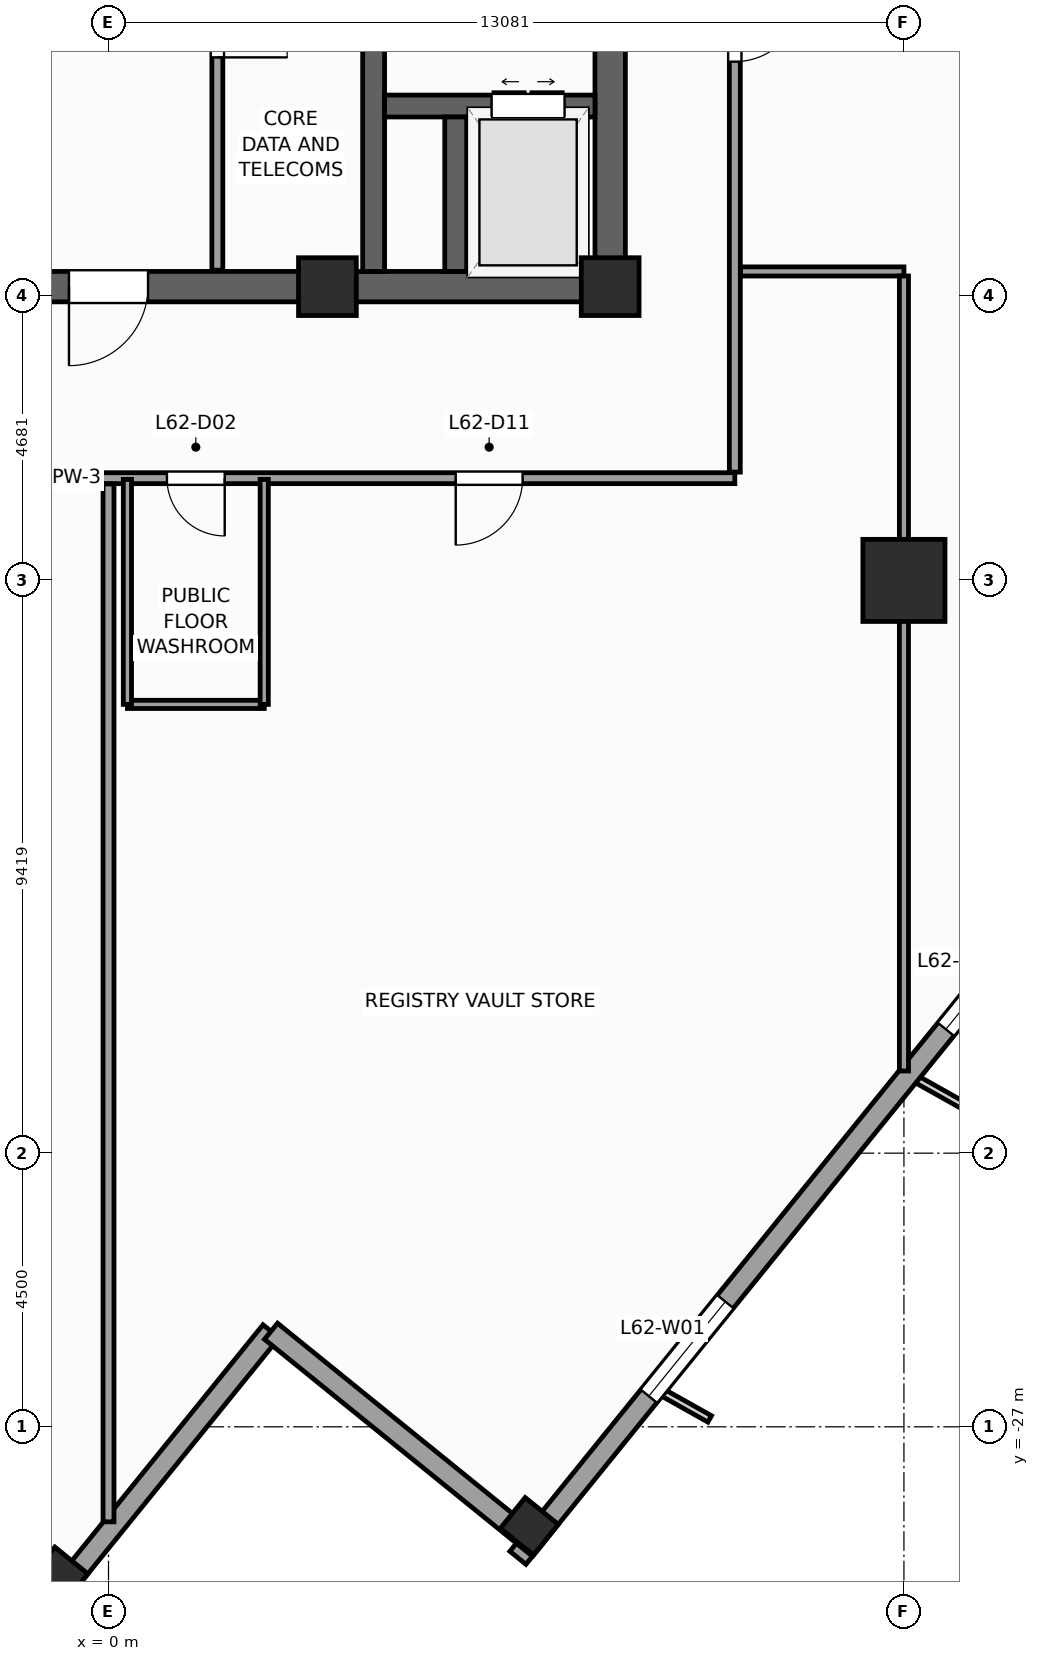
"""IFC4 building model, lengths in metres.
Left out: names, types, materials, properties, quantities, classifications, styles, units other than length and angle.
Written with IfcOpenShell. Run it as: python <this file> out.ifc"""

import sys

from ifc_helpers import new_model, si_unit, direction, frame, frame_2d, origin, origin_2d, place, context, subcontext, project, spatial, rectangle, extrude, source, transform, mapped, element, fill, save


model = new_model("IFC4")
c1 = context("Model", 3, precision=1e-05, world=origin(), true_north=direction((0.0, 1.0)))
c2 = subcontext(c1, "Body", "Model", "MODEL_VIEW")
j1 = project(units=[si_unit("LENGTHUNIT", "METRE"), si_unit("PLANEANGLEUNIT", "RADIAN")], contexts=[c1])
p1 = place(None, origin())
s1 = spatial("IfcSite", under=j1, at=p1, CompositionType="ELEMENT")
p2 = place(p1, origin())
s2 = spatial("IfcBuilding", under=s1, at=p2, CompositionType="ELEMENT")
p3 = place(p2, frame((0.0, 0.0, 256.3)))
s3 = spatial("IfcBuildingStorey", under=s2, at=p3, CompositionType="ELEMENT", Elevation=256.3)
p4 = place(p3, frame((-8.5, -8.25, 0.0), z_axis=(0.0, 0.0, 1.0), x_axis=(1.0, 0.0, 0.0)))
e1 = element("IfcWall", 1, at=p4, inside=s3, PredefinedType="SHEAR", context=c2, shape_type="SweptSolid", body=[
    extrude(rectangle(XDim=17.0, YDim=0.5, at=frame_2d((8.5, 0.0))), origin(), (0.0, 0.0, 1.0), 3.9),
])
p5 = place(p4, frame((7.85, 0.0, 0.0)))
e2 = element("IfcOpeningElement", 2, at=p5, cuts=e1, PredefinedType="OPENING", context=c2, shape_type="SweptSolid", body=[
    extrude(rectangle(XDim=1.3, YDim=2.2, at=frame_2d((0.65, 1.1))), frame((0.0, 0.26, 0.0), z_axis=(0.0, -1.0, 0.0), x_axis=(1.0, 0.0, 0.0)), (0.0, 0.0, 1.0), 0.52),
])
p6 = place(p3, frame((8.25, -8.0, 0.0), z_axis=(0.0, 0.0, 1.0), x_axis=(0.0, 1.0, 0.0)))
e3 = element("IfcWall", 3, at=p6, inside=s3, PredefinedType="SHEAR", context=c2, shape_type="SweptSolid", body=[
    extrude(rectangle(XDim=16.0, YDim=0.5, at=frame_2d((8.0, 0.0))), origin(), (0.0, 0.0, 1.0), 3.9),
])
p7 = place(p6, frame((4.69, 0.0, 0.0)))
e4 = element("IfcOpeningElement", 4, at=p7, cuts=e3, PredefinedType="OPENING", context=c2, shape_type="SweptSolid", body=[
    extrude(rectangle(XDim=1.3, YDim=2.2, at=frame_2d((0.65, 1.1))), frame((0.0, 0.26, 0.0), z_axis=(0.0, -1.0, 0.0), x_axis=(1.0, 0.0, 0.0)), (0.0, 0.0, 1.0), 0.52),
])
p8 = place(p3, frame((4.36, -8.0, 0.0), z_axis=(0.0, 0.0, 1.0), x_axis=(0.0, 1.0, 0.0)))
e5 = element("IfcWall", 5, at=p8, inside=s3, PredefinedType="SHEAR", context=c2, shape_type="SweptSolid", body=[
    extrude(rectangle(XDim=16.0, YDim=0.36, at=frame_2d((8.0, 0.0))), origin(), (0.0, 0.0, 1.0), 3.9),
])
p9 = place(p3, frame((4.54, -5.28, 0.0), z_axis=(0.0, 0.0, 1.0), x_axis=(1.0, 0.0, 0.0)))
e6 = element("IfcWall", 6, at=p9, inside=s3, PredefinedType="SHEAR", context=c2, shape_type="SweptSolid", body=[
    extrude(rectangle(XDim=3.46, YDim=0.36, at=frame_2d((1.73, 0.0))), origin(), (0.0, 0.0, 1.0), 3.9),
])
p10 = place(p9, frame((1.76, 0.0, 0.0)))
e7 = element("IfcOpeningElement", 7, at=p10, cuts=e6, PredefinedType="OPENING", context=c2, shape_type="SweptSolid", body=[
    extrude(rectangle(XDim=1.2, YDim=2.25, at=frame_2d((0.6, 1.125))), frame((0.0, 0.19, 0.0), z_axis=(0.0, -1.0, 0.0), x_axis=(1.0, 0.0, 0.0)), (0.0, 0.0, 1.0), 0.38),
])
p11 = place(p3, frame((5.71, -8.0, 0.0), z_axis=(0.0, 0.0, 1.0), x_axis=(0.0, 1.0, 0.0)))
e8 = element("IfcWall", 8, at=p11, inside=s3, PredefinedType="SHEAR", context=c2, shape_type="SweptSolid", body=[
    extrude(rectangle(XDim=2.54, YDim=0.36, at=frame_2d((1.27, 0.0))), origin(), (0.0, 0.0, 1.0), 3.9),
])
m1 = source(origin(), c2, "Body", "SweptSolid", [
    extrude(rectangle(XDim=0.95, YDim=0.95, at=origin_2d()), origin(), (0.0, 0.0, 1.0), 3.9),
])
for number, where, z_axis, x_axis in (
    (9, (8.25, -8.25, 0.0), (0.0, 0.0, 1.0), (1.0, 0.0, 0.0)),
    (10, (3.6, -8.25, 0.0), (0.0, 0.0, 1.0), (1.0, 0.0, 0.0)),
):
    element("IfcColumn", number, at=place(p3, frame(where, z_axis=z_axis, x_axis=x_axis)), inside=s3, PredefinedType="PILASTER", context=c2, shape_type="MappedRepresentation", body=[
        mapped(m1, transform((0.0, 0.0, 0.0), scale=1.0)),
    ])
m2 = source(origin(), c2, "Body", "SweptSolid", [
    extrude(rectangle(XDim=1.35, YDim=1.35, at=origin_2d()), origin(), (0.0, 0.0, 1.0), 3.9),
])
p12 = place(p3, frame((13.081, -13.081, 0.0), z_axis=(0.0, 0.0, 1.0), x_axis=(1.0, 0.0, 0.0)))
e11 = element("IfcColumn", 11, at=p12, inside=s3, PredefinedType="COLUMN", context=c2, shape_type="MappedRepresentation", body=[
    mapped(m2, transform((0.0, 0.0, 0.0), scale=1.0)),
])
m3 = source(origin(), c2, "Body", "SweptSolid", [
    extrude(rectangle(XDim=0.65, YDim=0.7, at=origin_2d()), origin(), (0.0, 0.0, 1.0), 3.9),
])
for number, where, z_axis, x_axis in (
    (12, (6.92, -28.637, 0.0), (0.0, 0.0, 1.0), (0.629, 0.777, 0.0)),
    (13, (-0.815, -29.45, 0.0), (0.0, 0.0, 1.0), (0.629, 0.777, 0.0)),
):
    element("IfcColumn", number, at=place(p3, frame(where, z_axis=z_axis, x_axis=x_axis)), inside=s3, PredefinedType="COLUMN", context=c2, shape_type="MappedRepresentation", body=[
        mapped(m3, transform((0.0, 0.0, 0.0), scale=1.0)),
    ])
p13 = place(p3, frame((6.733, -29.154, 0.0), z_axis=(0.0, 0.0, 1.0), x_axis=(0.629325378072, 0.77714192302, 0.0)))
e14 = element("IfcWall", 14, at=p13, inside=s3, PredefinedType="STANDARD", context=c2, shape_type="SweptSolid", body=[
    extrude(rectangle(XDim=36.84, YDim=0.34, at=frame_2d((18.42, 0.0))), origin(), (0.0, 0.0, 1.0), 2.02),
])
p14 = place(p13, frame((23.495, 0.0, 0.0)))
e15 = element("IfcOpeningElement", 15, at=p14, cuts=e14, PredefinedType="OPENING", context=c2, shape_type="SweptSolid", body=[
    extrude(rectangle(XDim=1.05, YDim=2.02, at=frame_2d((0.525, 1.01))), frame((0.0, 0.18, 0.0), z_axis=(0.0, -1.0, 0.0), x_axis=(1.0, 0.0, 0.0)), (0.0, 0.0, 1.0), 0.36),
])
p15 = place(p13, frame((3.421, 0.0, 0.49)))
e16 = element("IfcOpeningElement", 16, at=p15, cuts=e14, PredefinedType="OPENING", context=c2, shape_type="SweptSolid", body=[
    extrude(rectangle(XDim=2.0, YDim=1.45, at=frame_2d((1.0, 0.725))), frame((0.0, 0.18, 0.0), z_axis=(0.0, -1.0, 0.0), x_axis=(1.0, 0.0, 0.0)), (0.0, 0.0, 1.0), 0.36),
])
p16 = place(p13, frame((11.184, 0.0, 0.49)))
e17 = element("IfcOpeningElement", 17, at=p16, cuts=e14, PredefinedType="OPENING", context=c2, shape_type="SweptSolid", body=[
    extrude(rectangle(XDim=2.0, YDim=1.45, at=frame_2d((1.0, 0.725))), frame((0.0, 0.18, 0.0), z_axis=(0.0, -1.0, 0.0), x_axis=(1.0, 0.0, 0.0)), (0.0, 0.0, 1.0), 0.36),
])
p17 = place(p13, frame((15.183, 0.0, 0.49)))
e18 = element("IfcOpeningElement", 18, at=p17, cuts=e14, PredefinedType="OPENING", context=c2, shape_type="SweptSolid", body=[
    extrude(rectangle(XDim=2.0, YDim=1.45, at=frame_2d((1.0, 0.725))), frame((0.0, 0.18, 0.0), z_axis=(0.0, -1.0, 0.0), x_axis=(1.0, 0.0, 0.0)), (0.0, 0.0, 1.0), 0.36),
])
p18 = place(p13, frame((26.301, 0.0, 0.49)))
e19 = element("IfcOpeningElement", 19, at=p18, cuts=e14, PredefinedType="OPENING", context=c2, shape_type="SweptSolid", body=[
    extrude(rectangle(XDim=2.0, YDim=1.45, at=frame_2d((1.0, 0.725))), frame((0.0, 0.18, 0.0), z_axis=(0.0, -1.0, 0.0), x_axis=(1.0, 0.0, 0.0)), (0.0, 0.0, 1.0), 0.36),
])
p19 = place(p13, frame((30.682, 0.0, 0.49)))
e20 = element("IfcOpeningElement", 20, at=p19, cuts=e14, PredefinedType="OPENING", context=c2, shape_type="SweptSolid", body=[
    extrude(rectangle(XDim=2.0, YDim=1.45, at=frame_2d((1.0, 0.725))), frame((0.0, 0.18, 0.0), z_axis=(0.0, -1.0, 0.0), x_axis=(1.0, 0.0, 0.0)), (0.0, 0.0, 1.0), 0.36),
])
p20 = place(p3, frame((-29.154, -6.733, 0.0), z_axis=(0.0, 0.0, 1.0), x_axis=(0.77714192302, -0.629325378072, 0.0)))
e21 = element("IfcWall", 21, at=p20, inside=s3, PredefinedType="STANDARD", context=c2, shape_type="SweptSolid", body=[
    extrude(rectangle(XDim=36.84, YDim=0.34, at=frame_2d((18.42, 0.0))), origin(), (0.0, 0.0, 1.0), 2.02),
])
p21 = place(p20, frame((3.421, 0.0, 0.49)))
e22 = element("IfcOpeningElement", 22, at=p21, cuts=e21, PredefinedType="OPENING", context=c2, shape_type="SweptSolid", body=[
    extrude(rectangle(XDim=2.0, YDim=1.45, at=frame_2d((1.0, 0.725))), frame((0.0, 0.18, 0.0), z_axis=(0.0, -1.0, 0.0), x_axis=(1.0, 0.0, 0.0)), (0.0, 0.0, 1.0), 0.36),
])
p22 = place(p20, frame((9.684, 0.0, 0.49)))
e23 = element("IfcOpeningElement", 23, at=p22, cuts=e21, PredefinedType="OPENING", context=c2, shape_type="SweptSolid", body=[
    extrude(rectangle(XDim=2.0, YDim=1.45, at=frame_2d((1.0, 0.725))), frame((0.0, 0.18, 0.0), z_axis=(0.0, -1.0, 0.0), x_axis=(1.0, 0.0, 0.0)), (0.0, 0.0, 1.0), 0.36),
])
p23 = place(p20, frame((15.183, 0.0, 0.49)))
e24 = element("IfcOpeningElement", 24, at=p23, cuts=e21, PredefinedType="OPENING", context=c2, shape_type="SweptSolid", body=[
    extrude(rectangle(XDim=2.0, YDim=1.45, at=frame_2d((1.0, 0.725))), frame((0.0, 0.18, 0.0), z_axis=(0.0, -1.0, 0.0), x_axis=(1.0, 0.0, 0.0)), (0.0, 0.0, 1.0), 0.36),
])
p24 = place(p20, frame((24.051, 0.0, 0.49)))
e25 = element("IfcOpeningElement", 25, at=p24, cuts=e21, PredefinedType="OPENING", context=c2, shape_type="SweptSolid", body=[
    extrude(rectangle(XDim=2.0, YDim=1.45, at=frame_2d((1.0, 0.725))), frame((0.0, 0.18, 0.0), z_axis=(0.0, -1.0, 0.0), x_axis=(1.0, 0.0, 0.0)), (0.0, 0.0, 1.0), 0.36),
])
p25 = place(p20, frame((30.682, 0.0, 0.49)))
e26 = element("IfcOpeningElement", 26, at=p25, cuts=e21, PredefinedType="OPENING", context=c2, shape_type="SweptSolid", body=[
    extrude(rectangle(XDim=2.0, YDim=1.45, at=frame_2d((1.0, 0.725))), frame((0.0, 0.18, 0.0), z_axis=(0.0, -1.0, 0.0), x_axis=(1.0, 0.0, 0.0)), (0.0, 0.0, 1.0), 0.36),
])
p26 = place(p3, frame((-0.789, -29.703, 0.0), z_axis=(0.0, 0.0, 1.0), x_axis=(0.629323365087, 0.77714355312, 0.0)))
e27 = element("IfcWall", 27, at=p26, inside=s3, PredefinedType="STANDARD", context=c2, shape_type="SweptSolid", body=[
    extrude(rectangle(XDim=5.5, YDim=0.34, at=frame_2d((2.75, 0.0))), origin(), (0.0, 0.0, 1.0), 3.5),
])
p27 = place(p3, frame((2.673, -25.429, 0.0), z_axis=(0.0, 0.0, 1.0), x_axis=(0.777162640055, -0.629299794138, 0.0)))
e28 = element("IfcWall", 28, at=p27, inside=s3, PredefinedType="STANDARD", context=c2, shape_type="SweptSolid", body=[
    extrude(rectangle(XDim=5.67, YDim=0.34, at=frame_2d((2.835, 0.0))), origin(), (0.0, 0.0, 1.0), 2.02),
])
p28 = place(p3, frame((1.79, -7.98, 0.0), z_axis=(0.0, 0.0, 1.0), x_axis=(0.0, 1.0, 0.0)))
e29 = element("IfcWall", 29, at=p28, inside=s3, PredefinedType="PARTITIONING", context=c2, shape_type="SweptSolid", body=[
    extrude(rectangle(XDim=12.38, YDim=0.18, at=frame_2d((6.19, 0.0))), origin(), (0.0, 0.0, 1.0), 3.5),
])
p29 = place(p28, frame((8.8, 0.0, 0.0)))
e30 = element("IfcOpeningElement", 30, at=p29, cuts=e29, PredefinedType="OPENING", context=c2, shape_type="SweptSolid", body=[
    extrude(rectangle(XDim=1.1, YDim=2.2, at=frame_2d((0.55, 1.1))), frame((0.0, 0.1, 0.0), z_axis=(0.0, -1.0, 0.0), x_axis=(1.0, 0.0, 0.0)), (0.0, 0.0, 1.0), 0.2),
])
p30 = place(p28, frame((10.86, 0.0, 0.0)))
e31 = element("IfcOpeningElement", 31, at=p30, cuts=e29, PredefinedType="OPENING", context=c2, shape_type="SweptSolid", body=[
    extrude(rectangle(XDim=1.1, YDim=2.2, at=frame_2d((0.55, 1.1))), frame((0.0, 0.1, 0.0), z_axis=(0.0, -1.0, 0.0), x_axis=(1.0, 0.0, 0.0)), (0.0, 0.0, 1.0), 0.2),
])
p31 = place(p28, frame((3.5, 0.0, 0.0)))
e32 = element("IfcOpeningElement", 32, at=p31, cuts=e29, PredefinedType="OPENING", context=c2, shape_type="SweptSolid", body=[
    extrude(rectangle(XDim=1.15, YDim=2.25, at=frame_2d((0.575, 1.125))), frame((0.0, 0.1, 0.0), z_axis=(0.0, -1.0, 0.0), x_axis=(1.0, 0.0, 0.0)), (0.0, 0.0, 1.0), 0.2),
])
p32 = place(p3, frame((-11.35, -11.4, 0.0), z_axis=(0.0, 0.0, 1.0), x_axis=(1.0, 0.0, 0.0)))
e33 = element("IfcWall", 33, at=p32, inside=s3, PredefinedType="PARTITIONING", context=c2, shape_type="SweptSolid", body=[
    extrude(rectangle(XDim=21.65, YDim=0.18, at=frame_2d((10.825, 0.0))), origin(), (0.0, 0.0, 1.0), 3.5),
])
p33 = place(p32, frame((1.455, 0.0, 0.0)))
e34 = element("IfcOpeningElement", 34, at=p33, cuts=e33, PredefinedType="OPENING", context=c2, shape_type="SweptSolid", body=[
    extrude(rectangle(XDim=0.95, YDim=2.1, at=frame_2d((0.475, 1.05))), frame((0.0, 0.1, 0.0), z_axis=(0.0, -1.0, 0.0), x_axis=(1.0, 0.0, 0.0)), (0.0, 0.0, 1.0), 0.2),
])
p34 = place(p32, frame((12.311, 0.0, 0.0)))
e35 = element("IfcOpeningElement", 35, at=p34, cuts=e33, PredefinedType="OPENING", context=c2, shape_type="SweptSolid", body=[
    extrude(rectangle(XDim=0.95, YDim=2.1, at=frame_2d((0.475, 1.05))), frame((0.0, 0.1, 0.0), z_axis=(0.0, -1.0, 0.0), x_axis=(1.0, 0.0, 0.0)), (0.0, 0.0, 1.0), 0.2),
])
p35 = place(p32, frame((17.06, 0.0, 0.0)))
e36 = element("IfcOpeningElement", 36, at=p35, cuts=e33, PredefinedType="OPENING", context=c2, shape_type="SweptSolid", body=[
    extrude(rectangle(XDim=1.1, YDim=2.2, at=frame_2d((0.55, 1.1))), frame((0.0, 0.1, 0.0), z_axis=(0.0, -1.0, 0.0), x_axis=(1.0, 0.0, 0.0)), (0.0, 0.0, 1.0), 0.2),
])
p36 = place(p32, frame((6.584, 0.0, 0.0)))
e37 = element("IfcOpeningElement", 37, at=p36, cuts=e33, PredefinedType="OPENING", context=c2, shape_type="SweptSolid", body=[
    extrude(rectangle(XDim=1.1, YDim=2.2, at=frame_2d((0.55, 1.1))), frame((0.0, 0.1, 0.0), z_axis=(0.0, -1.0, 0.0), x_axis=(1.0, 0.0, 0.0)), (0.0, 0.0, 1.0), 0.2),
])
p37 = place(p3, frame((10.3, -11.3, 0.0), z_axis=(0.0, 0.0, 1.0), x_axis=(0.0, 1.0, 0.0)))
e38 = element("IfcWall", 38, at=p37, inside=s3, PredefinedType="PARTITIONING", context=c2, shape_type="SweptSolid", body=[
    extrude(rectangle(XDim=23.65, YDim=0.18, at=frame_2d((11.825, 0.0))), origin(), (0.0, 0.0, 1.0), 3.5),
])
p38 = place(p37, frame((14.75, 0.0, 0.0)))
e39 = element("IfcOpeningElement", 39, at=p38, cuts=e38, PredefinedType="OPENING", context=c2, shape_type="SweptSolid", body=[
    extrude(rectangle(XDim=1.1, YDim=2.2, at=frame_2d((0.55, 1.1))), frame((0.0, 0.1, 0.0), z_axis=(0.0, -1.0, 0.0), x_axis=(1.0, 0.0, 0.0)), (0.0, 0.0, 1.0), 0.2),
])
p39 = place(p37, frame((6.75, 0.0, 0.0)))
e40 = element("IfcOpeningElement", 40, at=p39, cuts=e38, PredefinedType="OPENING", context=c2, shape_type="SweptSolid", body=[
    extrude(rectangle(XDim=1.1, YDim=2.2, at=frame_2d((0.55, 1.1))), frame((0.0, 0.1, 0.0), z_axis=(0.0, -1.0, 0.0), x_axis=(1.0, 0.0, 0.0)), (0.0, 0.0, 1.0), 0.2),
])
p40 = place(p3, frame((0.0, -11.495, 0.0), z_axis=(0.0, 0.0, 1.0), x_axis=(0.0, -1.0, 0.0)))
e41 = element("IfcWall", 41, at=p40, inside=s3, PredefinedType="PARTITIONING", context=c2, shape_type="SweptSolid", body=[
    extrude(rectangle(XDim=17.067, YDim=0.18, at=frame_2d((8.534, 0.0))), origin(), (0.0, 0.0, 1.0), 3.5),
])
p41 = place(p3, frame((10.395, -8.0, 0.0), z_axis=(0.0, 0.0, 1.0), x_axis=(1.0, 0.0, 0.0)))
e42 = element("IfcWall", 42, at=p41, inside=s3, PredefinedType="PARTITIONING", context=c2, shape_type="SweptSolid", body=[
    extrude(rectangle(XDim=2.686, YDim=0.15, at=frame_2d((1.343, 0.0))), origin(), (0.0, 0.0, 1.0), 3.5),
])
p42 = place(p3, frame((13.081, -8.075, 0.0), z_axis=(0.0, 0.0, 1.0), x_axis=(0.0, -1.0, 0.0)))
e43 = element("IfcWall", 43, at=p42, inside=s3, PredefinedType="PARTITIONING", context=c2, shape_type="SweptSolid", body=[
    extrude(rectangle(XDim=13.073, YDim=0.15, at=frame_2d((6.537, 0.0))), origin(), (0.0, 0.0, 1.0), 2.02),
])
p43 = place(p3, frame((0.311, -15.12, 0.0), z_axis=(0.0, 0.0, 1.0), x_axis=(1.0, 0.0, 0.0)))
e44 = element("IfcWall", 44, at=p43, inside=s3, PredefinedType="PARTITIONING", context=c2, shape_type="SweptSolid", body=[
    extrude(rectangle(XDim=2.25, YDim=0.135, at=frame_2d((1.125, 0.0))), origin(), (0.0, 0.0, 1.0), 3.5),
])
for number, where, z_axis, x_axis in (
    (45, (2.561, -15.12, 0.0), (0.0, 0.0, 1.0), (0.0, 1.0, 0.0)),
    (46, (0.311, -15.12, 0.0), (0.0, 0.0, 1.0), (0.0, 1.0, 0.0)),
):
    element("IfcWall", number, at=place(p3, frame(where, z_axis=z_axis, x_axis=x_axis)), inside=s3, PredefinedType="PARTITIONING", context=c2, shape_type="SweptSolid", body=[
        extrude(rectangle(XDim=3.7, YDim=0.135, at=frame_2d((1.85, 0.0))), origin(), (0.0, 0.0, 1.0), 3.5),
    ])
m4 = source(origin(), c2, "Body", "SweptSolid", [
    extrude(rectangle(XDim=2.0, YDim=1.45, at=frame_2d((1.0, 0.725))), frame((0.0, 0.03, 0.0), z_axis=(0.0, -1.0, 0.0), x_axis=(1.0, 0.0, 0.0)), (0.0, 0.0, 1.0), 0.06),
])
p44 = place(p15, origin())
e47 = element("IfcWindow", 47, at=p44, inside=s3, PartitioningType="SINGLE_PANEL", PredefinedType="WINDOW", context=c2, shape_type="MappedRepresentation", body=[
    mapped(m4, transform((0.0, 0.0, 0.0), scale=1.0)),
])
fill(e16, e47)
p45 = place(p16, origin())
e48 = element("IfcWindow", 48, at=p45, inside=s3, PartitioningType="SINGLE_PANEL", PredefinedType="WINDOW", context=c2, shape_type="MappedRepresentation", body=[
    mapped(m4, transform((0.0, 0.0, 0.0), scale=1.0)),
])
fill(e17, e48)
m5 = source(origin(), c2, "Body", "SweptSolid", [
    extrude(rectangle(XDim=1.3, YDim=2.2, at=frame_2d((0.65, 1.1))), frame((0.0, 0.025, 0.0), z_axis=(0.0, -1.0, 0.0), x_axis=(1.0, 0.0, 0.0)), (0.0, 0.0, 1.0), 0.05),
])
p46 = place(p5, frame((1.3, 0.0, 0.0), z_axis=(0.0, 0.0, 1.0), x_axis=(-1.0, 0.0, 0.0)))
e49 = element("IfcDoor", 49, at=p46, inside=s3, OperationType="SINGLE_SWING_LEFT", PredefinedType="DOOR", context=c2, shape_type="MappedRepresentation", body=[
    mapped(m5, transform((0.0, 0.0, 0.0), scale=1.0)),
])
fill(e2, e49)
m6 = source(origin(), c2, "Body", "SweptSolid", [
    extrude(rectangle(XDim=1.2, YDim=2.25, at=frame_2d((0.6, 1.125))), frame((0.0, 0.025, 0.0), z_axis=(0.0, -1.0, 0.0), x_axis=(1.0, 0.0, 0.0)), (0.0, 0.0, 1.0), 0.05),
])
p47 = place(p10, origin())
e50 = element("IfcDoor", 50, at=p47, inside=s3, OperationType="DOUBLE_DOOR_SLIDING", PredefinedType="DOOR", context=c2, shape_type="MappedRepresentation", body=[
    mapped(m6, transform((0.0, 0.0, 0.0), scale=1.0)),
])
fill(e7, e50)
m7 = source(origin(), c2, "Body", "SweptSolid", [
    extrude(rectangle(XDim=1.15, YDim=2.25, at=frame_2d((0.575, 1.125))), frame((0.0, 0.025, 0.0), z_axis=(0.0, -1.0, 0.0), x_axis=(1.0, 0.0, 0.0)), (0.0, 0.0, 1.0), 0.05),
])
p48 = place(p31, frame((1.15, 0.0, 0.0), z_axis=(0.0, 0.0, 1.0), x_axis=(-1.0, 0.0, 0.0)))
e51 = element("IfcDoor", 51, at=p48, inside=s3, OperationType="SINGLE_SWING_LEFT", PredefinedType="DOOR", context=c2, shape_type="MappedRepresentation", body=[
    mapped(m7, transform((0.0, 0.0, 0.0), scale=1.0)),
])
fill(e32, e51)
m8 = source(origin(), c2, "Body", "SweptSolid", [
    extrude(rectangle(XDim=0.95, YDim=2.1, at=frame_2d((0.475, 1.05))), frame((0.0, 0.025, 0.0), z_axis=(0.0, -1.0, 0.0), x_axis=(1.0, 0.0, 0.0)), (0.0, 0.0, 1.0), 0.05),
])
p49 = place(p34, frame((0.95, 0.0, 0.0), z_axis=(0.0, 0.0, 1.0), x_axis=(-1.0, 0.0, 0.0)))
e52 = element("IfcDoor", 52, at=p49, inside=s3, OperationType="SINGLE_SWING_RIGHT", PredefinedType="DOOR", context=c2, shape_type="MappedRepresentation", body=[
    mapped(m8, transform((0.0, 0.0, 0.0), scale=1.0)),
])
fill(e35, e52)
m9 = source(origin(), c2, "Body", "SweptSolid", [
    extrude(rectangle(XDim=1.1, YDim=2.2, at=frame_2d((0.55, 1.1))), frame((0.0, 0.025, 0.0), z_axis=(0.0, -1.0, 0.0), x_axis=(1.0, 0.0, 0.0)), (0.0, 0.0, 1.0), 0.05),
])
p50 = place(p39, frame((1.1, 0.0, 0.0), z_axis=(0.0, 0.0, 1.0), x_axis=(-1.0, 0.0, 0.0)))
e53 = element("IfcDoor", 53, at=p50, inside=s3, OperationType="SINGLE_SWING_RIGHT", PredefinedType="DOOR", context=c2, shape_type="MappedRepresentation", body=[
    mapped(m9, transform((0.0, 0.0, 0.0), scale=1.0)),
])
fill(e40, e53)
p51 = place(p35, frame((1.1, 0.0, 0.0), z_axis=(0.0, 0.0, 1.0), x_axis=(-1.0, 0.0, 0.0)))
e54 = element("IfcDoor", 54, at=p51, inside=s3, OperationType="SINGLE_SWING_LEFT", PredefinedType="DOOR", context=c2, shape_type="MappedRepresentation", body=[
    mapped(m9, transform((0.0, 0.0, 0.0), scale=1.0)),
])
fill(e36, e54)
save(model, sys.argv[1])
